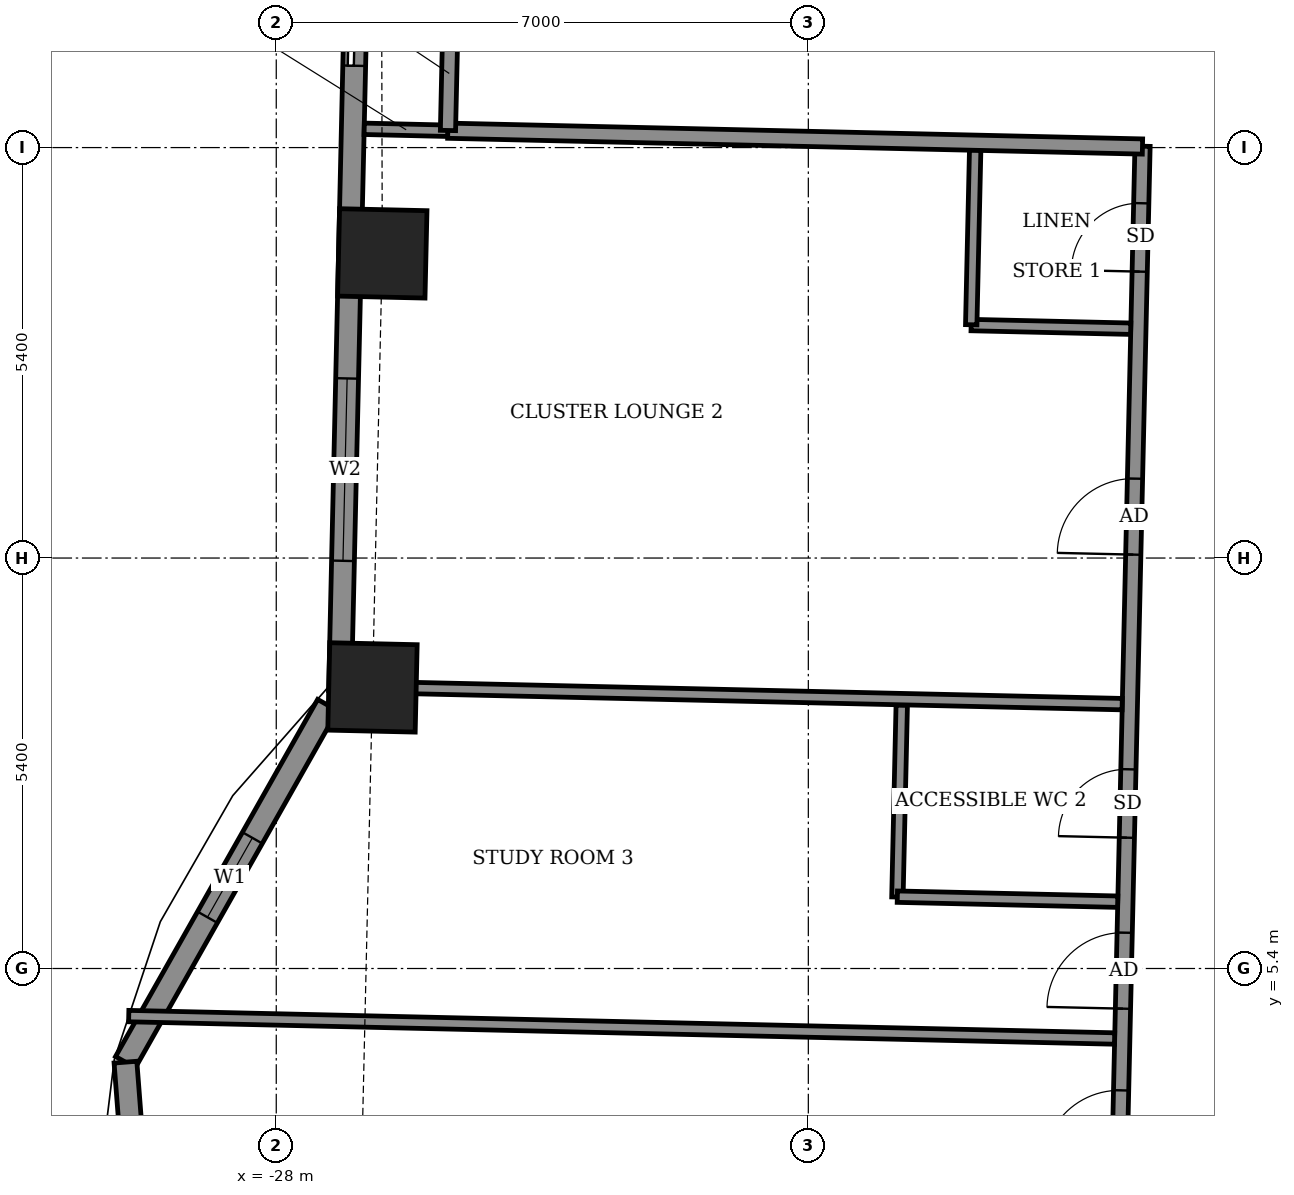
"""IFC4 building model, lengths in metres.
Left out: names, types, materials, properties, quantities, classifications, styles, units other than length and angle.
Written with IfcOpenShell. Run it as: python <this file> out.ifc"""

import sys

from ifc_helpers import new_model, si_unit, direction, frame, frame_2d, origin, origin_2d, place, context, subcontext, project, spatial, rectangle, extrude, element, fill, save


model = new_model("IFC4")
c1 = context("Model", 3, precision=1e-05, world=origin(), true_north=direction((0.0, 1.0)))
c2 = subcontext(c1, "Body", "Model", "MODEL_VIEW")
j1 = project(units=[si_unit("LENGTHUNIT", "METRE"), si_unit("PLANEANGLEUNIT", "RADIAN")], contexts=[c1])
p1 = place(None, origin())
s1 = spatial("IfcSite", under=j1, at=p1, CompositionType="ELEMENT")
p2 = place(p1, origin())
s2 = spatial("IfcBuilding", under=s1, at=p2, CompositionType="ELEMENT")
p3 = place(p2, frame((0.0, 0.0, 197.9)))
s3 = spatial("IfcBuildingStorey", under=s2, at=p3, CompositionType="ELEMENT", Elevation=197.9)
for number, where, z_axis, x_axis in (
    (1, (-26.605, 14.808, -0.55), (0.0, 0.0, 1.0), (-0.023, -1.0, 0.0)),
    (2, (-26.734, 9.098, -0.55), (0.0, 0.0, 1.0), (-0.023, -1.0, 0.0)),
):
    element("IfcColumn", number, at=place(p3, frame(where, z_axis=z_axis, x_axis=x_axis)), inside=s3, PredefinedType="COLUMN", context=c2, shape_type="SweptSolid", body=[
        extrude(rectangle(XDim=1.15, YDim=1.15, at=origin_2d()), origin(), (0.0, 0.0, 1.0), 3.6),
    ])
p4 = place(p3, frame((-26.904, 20.379, 0.0), z_axis=(0.0, 0.0, 1.0), x_axis=(-0.022669030322, -0.999743024514, 0.0)))
e3 = element("IfcWall", 3, at=p4, inside=s3, PredefinedType="SOLIDWALL", context=c2, shape_type="SweptSolid", body=[
    extrude(rectangle(XDim=11.33, YDim=0.3, at=frame_2d((5.665, 0.0))), origin(), (0.0, 0.0, 1.0), 2.55),
])
p5 = place(p4, frame((1.603, 0.0, 0.0)))
e4 = element("IfcOpeningElement", 4, at=p5, cuts=e3, PredefinedType="OPENING", context=c2, shape_type="SweptSolid", body=[
    extrude(rectangle(XDim=1.5, YDim=2.4, at=frame_2d((0.75, 1.2))), frame((0.0, 0.16, 0.0), z_axis=(0.0, -1.0, 0.0), x_axis=(1.0, 0.0, 0.0)), (0.0, 0.0, 1.0), 0.32),
])
p6 = place(p4, frame((7.218, 0.0, 0.9)))
e5 = element("IfcOpeningElement", 5, at=p6, cuts=e3, PredefinedType="OPENING", context=c2, shape_type="SweptSolid", body=[
    extrude(rectangle(XDim=2.4, YDim=1.5, at=frame_2d((1.2, 0.75))), frame((0.0, 0.16, 0.0), z_axis=(0.0, -1.0, 0.0), x_axis=(1.0, 0.0, 0.0)), (0.0, 0.0, 1.0), 0.32),
])
p7 = place(p3, frame((-27.325, 8.866, 0.0), z_axis=(0.0, 0.0, 1.0), x_axis=(-0.492554919955, -0.870281363025, 0.0)))
e6 = element("IfcWall", 6, at=p7, inside=s3, PredefinedType="SOLIDWALL", context=c2, shape_type="SweptSolid", body=[
    extrude(rectangle(XDim=5.398, YDim=0.3, at=frame_2d((2.699, 0.0))), origin(), (0.0, 0.0, 1.0), 3.05),
])
p8 = place(p7, frame((2.008, 0.0, 0.9)))
e7 = element("IfcOpeningElement", 7, at=p8, cuts=e6, PredefinedType="OPENING", context=c2, shape_type="SweptSolid", body=[
    extrude(rectangle(XDim=1.2, YDim=1.5, at=frame_2d((0.6, 0.75))), frame((0.0, 0.16, 0.0), z_axis=(0.0, -1.0, 0.0), x_axis=(1.0, 0.0, 0.0)), (0.0, 0.0, 1.0), 0.32),
])
p9 = place(p3, frame((-29.984, 4.168, 0.0), z_axis=(0.0, 0.0, 1.0), x_axis=(0.076964476481, -0.997033835614, 0.0)))
e8 = element("IfcWall", 8, at=p9, inside=s3, PredefinedType="SOLIDWALL", context=c2, shape_type="SweptSolid", body=[
    extrude(rectangle(XDim=5.573, YDim=0.3, at=frame_2d((2.787, 0.0))), origin(), (0.0, 0.0, 1.0), 3.05),
])
p10 = place(p9, frame((2.186, 0.0, 0.9)))
e9 = element("IfcOpeningElement", 9, at=p10, cuts=e8, PredefinedType="OPENING", context=c2, shape_type="SweptSolid", body=[
    extrude(rectangle(XDim=1.2, YDim=1.5, at=frame_2d((0.6, 0.75))), frame((0.0, 0.16, 0.0), z_axis=(0.0, -1.0, 0.0), x_axis=(1.0, 0.0, 0.0)), (0.0, 0.0, 1.0), 0.32),
])
p11 = place(p3, frame((-29.918, 9.42, 0.0), z_axis=(0.0, 0.0, 1.0), x_axis=(0.022681332769, 0.999742745482, 0.0)))
e10 = element("IfcWall", 10, at=p11, inside=s3, PredefinedType="USERDEFINED", context=c2, shape_type="SweptSolid", body=[
    extrude(rectangle(XDim=3.875, YDim=0.55, at=frame_2d((1.938, 0.0))), origin(), (0.0, 0.0, 1.0), 0.8),
])
p12 = place(p3, frame((-17.247, -12.149, 0.0), z_axis=(0.0, 0.0, 1.0), x_axis=(0.022698146637, 0.999742363881, 0.0)))
e11 = element("IfcWall", 11, at=p12, inside=s3, PredefinedType="PARTITIONING", context=c2, shape_type="SweptSolid", body=[
    extrude(rectangle(XDim=28.374, YDim=0.2, at=frame_2d((14.187, 0.0))), origin(), (0.0, 0.0, 1.0), 3.05),
])
p13 = place(p12, frame((23.0, 0.0, 0.0)))
e12 = element("IfcOpeningElement", 12, at=p13, cuts=e11, PredefinedType="OPENING", context=c2, shape_type="SweptSolid", body=[
    extrude(rectangle(XDim=1.0, YDim=2.1, at=frame_2d((0.5, 1.05))), frame((0.0, 0.11, 0.0), z_axis=(0.0, -1.0, 0.0), x_axis=(1.0, 0.0, 0.0)), (0.0, 0.0, 1.0), 0.22),
])
p14 = place(p12, frame((26.724, 0.0, 0.0)))
e13 = element("IfcOpeningElement", 13, at=p14, cuts=e11, PredefinedType="OPENING", context=c2, shape_type="SweptSolid", body=[
    extrude(rectangle(XDim=0.9, YDim=2.1, at=frame_2d((0.45, 1.05))), frame((0.0, 0.11, 0.0), z_axis=(0.0, -1.0, 0.0), x_axis=(1.0, 0.0, 0.0)), (0.0, 0.0, 1.0), 0.22),
])
p15 = place(p12, frame((17.025, 0.0, 0.0)))
e14 = element("IfcOpeningElement", 14, at=p15, cuts=e11, PredefinedType="OPENING", context=c2, shape_type="SweptSolid", body=[
    extrude(rectangle(XDim=1.0, YDim=2.1, at=frame_2d((0.5, 1.05))), frame((0.0, 0.11, 0.0), z_axis=(0.0, -1.0, 0.0), x_axis=(1.0, 0.0, 0.0)), (0.0, 0.0, 1.0), 0.22),
])
p16 = place(p12, frame((19.275, 0.0, 0.0)))
e15 = element("IfcOpeningElement", 15, at=p16, cuts=e11, PredefinedType="OPENING", context=c2, shape_type="SweptSolid", body=[
    extrude(rectangle(XDim=0.9, YDim=2.1, at=frame_2d((0.45, 1.05))), frame((0.0, 0.11, 0.0), z_axis=(0.0, -1.0, 0.0), x_axis=(1.0, 0.0, 0.0)), (0.0, 0.0, 1.0), 0.22),
])
p17 = place(p12, frame((14.95, 0.0, 0.0)))
e16 = element("IfcOpeningElement", 16, at=p17, cuts=e11, PredefinedType="OPENING", context=c2, shape_type="SweptSolid", body=[
    extrude(rectangle(XDim=1.0, YDim=2.1, at=frame_2d((0.5, 1.05))), frame((0.0, 0.11, 0.0), z_axis=(0.0, -1.0, 0.0), x_axis=(1.0, 0.0, 0.0)), (0.0, 0.0, 1.0), 0.22),
])
p18 = place(p12, frame((12.625, 0.0, 0.0)))
e17 = element("IfcOpeningElement", 17, at=p18, cuts=e11, PredefinedType="OPENING", context=c2, shape_type="SweptSolid", body=[
    extrude(rectangle(XDim=0.9, YDim=2.1, at=frame_2d((0.45, 1.05))), frame((0.0, 0.11, 0.0), z_axis=(0.0, -1.0, 0.0), x_axis=(1.0, 0.0, 0.0)), (0.0, 0.0, 1.0), 0.22),
])
p19 = place(p12, frame((10.275, 0.0, 0.0)))
e18 = element("IfcOpeningElement", 18, at=p19, cuts=e11, PredefinedType="OPENING", context=c2, shape_type="SweptSolid", body=[
    extrude(rectangle(XDim=1.0, YDim=2.1, at=frame_2d((0.5, 1.05))), frame((0.0, 0.11, 0.0), z_axis=(0.0, -1.0, 0.0), x_axis=(1.0, 0.0, 0.0)), (0.0, 0.0, 1.0), 0.22),
])
p20 = place(p12, frame((8.025, 0.0, 0.0)))
e19 = element("IfcOpeningElement", 19, at=p20, cuts=e11, PredefinedType="OPENING", context=c2, shape_type="SweptSolid", body=[
    extrude(rectangle(XDim=0.9, YDim=2.1, at=frame_2d((0.45, 1.05))), frame((0.0, 0.11, 0.0), z_axis=(0.0, -1.0, 0.0), x_axis=(1.0, 0.0, 0.0)), (0.0, 0.0, 1.0), 0.22),
])
p21 = place(p12, frame((4.337, 0.0, 0.0)))
e20 = element("IfcOpeningElement", 20, at=p21, cuts=e11, PredefinedType="OPENING", context=c2, shape_type="SweptSolid", body=[
    extrude(rectangle(XDim=1.0, YDim=2.1, at=frame_2d((0.5, 1.05))), frame((0.0, 0.11, 0.0), z_axis=(0.0, -1.0, 0.0), x_axis=(1.0, 0.0, 0.0)), (0.0, 0.0, 1.0), 0.22),
])
p22 = place(p12, frame((0.75, 0.0, 0.0)))
e21 = element("IfcOpeningElement", 21, at=p22, cuts=e11, PredefinedType="OPENING", context=c2, shape_type="SweptSolid", body=[
    extrude(rectangle(XDim=0.9, YDim=2.1, at=frame_2d((0.45, 1.05))), frame((0.0, 0.11, 0.0), z_axis=(0.0, -1.0, 0.0), x_axis=(1.0, 0.0, 0.0)), (0.0, 0.0, 1.0), 0.22),
])
p23 = place(p3, frame((-29.941, 4.774, 0.0), z_axis=(0.0, 0.0, 1.0), x_axis=(0.999741573163, -0.022732947207, 0.0)))
e22 = element("IfcWall", 22, at=p23, inside=s3, PredefinedType="PARTITIONING", context=c2, shape_type="SweptSolid", body=[
    extrude(rectangle(XDim=12.973, YDim=0.15, at=frame_2d((6.487, 0.0))), origin(), (0.0, 0.0, 1.0), 2.1),
])
p24 = place(p3, frame((-19.828, 6.34, 0.0), z_axis=(0.0, 0.0, 1.0), x_axis=(0.022532486354, 0.9997461113, 0.0)))
e23 = element("IfcWall", 23, at=p24, inside=s3, PredefinedType="PARTITIONING", context=c2, shape_type="SweptSolid", body=[
    extrude(rectangle(XDim=2.525, YDim=0.15, at=frame_2d((1.262, 0.0))), origin(), (0.0, 0.0, 1.0), 3.05),
])
p25 = place(p3, frame((-19.829, 6.345, 0.0), z_axis=(0.0, 0.0, 1.0), x_axis=(0.999741618182, -0.022730967319, 0.0)))
e24 = element("IfcWall", 24, at=p25, inside=s3, PredefinedType="PARTITIONING", context=c2, shape_type="SweptSolid", body=[
    extrude(rectangle(XDim=2.9, YDim=0.15, at=frame_2d((1.45, 0.0))), origin(), (0.0, 0.0, 1.0), 3.05),
])
p26 = place(p3, frame((-27.01, 9.108, 0.0), z_axis=(0.0, 0.0, 1.0), x_axis=(0.999742841246, -0.022677111331, 0.0)))
e25 = element("IfcWall", 25, at=p26, inside=s3, PredefinedType="PARTITIONING", context=c2, shape_type="SweptSolid", body=[
    extrude(rectangle(XDim=10.142, YDim=0.15, at=frame_2d((5.071, 0.0))), origin(), (0.0, 0.0, 1.0), 3.05),
])
p27 = place(p3, frame((-18.858, 13.865, 0.0), z_axis=(0.0, 0.0, 1.0), x_axis=(0.999737555419, -0.022908956429, 0.0)))
e26 = element("IfcWall", 26, at=p27, inside=s3, PredefinedType="PARTITIONING", context=c2, shape_type="SweptSolid", body=[
    extrude(rectangle(XDim=2.099, YDim=0.15, at=frame_2d((1.05, 0.0))), origin(), (0.0, 0.0, 1.0), 3.05),
])
p28 = place(p3, frame((-18.857, 13.869, 0.0), z_axis=(0.0, 0.0, 1.0), x_axis=(0.022612884682, 0.999744296031, 0.0)))
e27 = element("IfcWall", 27, at=p28, inside=s3, PredefinedType="PARTITIONING", context=c2, shape_type="SweptSolid", body=[
    extrude(rectangle(XDim=2.3, YDim=0.15, at=frame_2d((1.15, 0.0))), origin(), (0.0, 0.0, 1.0), 3.05),
])
p29 = place(p3, frame((-26.843, 16.447, 0.0), z_axis=(0.0, 0.0, 1.0), x_axis=(0.999720170098, -0.023655475055, 0.0)))
e28 = element("IfcWall", 28, at=p29, inside=s3, PredefinedType="PARTITIONING", context=c2, shape_type="SweptSolid", body=[
    extrude(rectangle(XDim=1.104, YDim=0.15, at=frame_2d((0.552, 0.0))), origin(), (0.0, 0.0, 1.0), 2.55),
])
p30 = place(p3, frame((-25.743, 16.422, 0.0), z_axis=(0.0, 0.0, 1.0), x_axis=(0.999741076645, -0.022754772455, 0.0)))
e29 = element("IfcWall", 29, at=p30, inside=s3, PredefinedType="PARTITIONING", context=c2, shape_type="SweptSolid", body=[
    extrude(rectangle(XDim=9.141, YDim=0.2, at=frame_2d((4.571, 0.0))), origin(), (0.0, 0.0, 1.0), 3.05),
])
p31 = place(p3, frame((-25.741, 16.425, 0.0), z_axis=(0.0, 0.0, 1.0), x_axis=(0.022617910375, 0.999744182344, 0.0)))
e30 = element("IfcWall", 30, at=p31, inside=s3, PredefinedType="PARTITIONING", context=c2, shape_type="SweptSolid", body=[
    extrude(rectangle(XDim=1.5, YDim=0.2, at=frame_2d((0.75, 0.0))), origin(), (0.0, 0.0, 1.0), 3.05),
])
p32 = place(p5, origin())
e31 = element("IfcDoor", 31, at=p32, inside=s3, OperationType="SLIDING_TO_LEFT", PredefinedType="DOOR", context=c2, shape_type="SweptSolid", body=[
    extrude(rectangle(XDim=1.5, YDim=2.4, at=frame_2d((0.75, 1.2))), frame((0.0, 0.025, 0.0), z_axis=(0.0, -1.0, 0.0), x_axis=(1.0, 0.0, 0.0)), (0.0, 0.0, 1.0), 0.05),
])
fill(e4, e31)
p33 = place(p6, origin())
e32 = element("IfcWindow", 32, at=p33, inside=s3, PartitioningType="DOUBLE_PANEL_VERTICAL", PredefinedType="WINDOW", context=c2, shape_type="SweptSolid", body=[
    extrude(rectangle(XDim=2.4, YDim=1.5, at=frame_2d((1.2, 0.75))), frame((0.0, 0.03, 0.0), z_axis=(0.0, -1.0, 0.0), x_axis=(1.0, 0.0, 0.0)), (0.0, 0.0, 1.0), 0.06),
])
fill(e5, e32)
p34 = place(p8, origin())
e33 = element("IfcWindow", 33, at=p34, inside=s3, PartitioningType="SINGLE_PANEL", PredefinedType="WINDOW", context=c2, shape_type="SweptSolid", body=[
    extrude(rectangle(XDim=1.2, YDim=1.5, at=frame_2d((0.6, 0.75))), frame((0.0, 0.03, 0.0), z_axis=(0.0, -1.0, 0.0), x_axis=(1.0, 0.0, 0.0)), (0.0, 0.0, 1.0), 0.06),
])
fill(e7, e33)
p35 = place(p13, origin())
e34 = element("IfcDoor", 34, at=p35, inside=s3, OperationType="SINGLE_SWING_LEFT", PredefinedType="DOOR", context=c2, shape_type="SweptSolid", body=[
    extrude(rectangle(XDim=1.0, YDim=2.1, at=frame_2d((0.5, 1.05))), frame((0.0, 0.025, 0.0), z_axis=(0.0, -1.0, 0.0), x_axis=(1.0, 0.0, 0.0)), (0.0, 0.0, 1.0), 0.05),
])
fill(e12, e34)
p36 = place(p14, origin())
e35 = element("IfcDoor", 35, at=p36, inside=s3, OperationType="SINGLE_SWING_RIGHT", PredefinedType="DOOR", context=c2, shape_type="SweptSolid", body=[
    extrude(rectangle(XDim=0.9, YDim=2.1, at=frame_2d((0.45, 1.05))), frame((0.0, 0.025, 0.0), z_axis=(0.0, -1.0, 0.0), x_axis=(1.0, 0.0, 0.0)), (0.0, 0.0, 1.0), 0.05),
])
fill(e13, e35)
p37 = place(p15, origin())
e36 = element("IfcDoor", 36, at=p37, inside=s3, OperationType="SINGLE_SWING_RIGHT", PredefinedType="DOOR", context=c2, shape_type="SweptSolid", body=[
    extrude(rectangle(XDim=1.0, YDim=2.1, at=frame_2d((0.5, 1.05))), frame((0.0, 0.025, 0.0), z_axis=(0.0, -1.0, 0.0), x_axis=(1.0, 0.0, 0.0)), (0.0, 0.0, 1.0), 0.05),
])
fill(e14, e36)
p38 = place(p16, origin())
e37 = element("IfcDoor", 37, at=p38, inside=s3, OperationType="SINGLE_SWING_LEFT", PredefinedType="DOOR", context=c2, shape_type="SweptSolid", body=[
    extrude(rectangle(XDim=0.9, YDim=2.1, at=frame_2d((0.45, 1.05))), frame((0.0, 0.025, 0.0), z_axis=(0.0, -1.0, 0.0), x_axis=(1.0, 0.0, 0.0)), (0.0, 0.0, 1.0), 0.05),
])
fill(e15, e37)
p39 = place(p17, origin())
e38 = element("IfcDoor", 38, at=p39, inside=s3, OperationType="SINGLE_SWING_LEFT", PredefinedType="DOOR", context=c2, shape_type="SweptSolid", body=[
    extrude(rectangle(XDim=1.0, YDim=2.1, at=frame_2d((0.5, 1.05))), frame((0.0, 0.025, 0.0), z_axis=(0.0, -1.0, 0.0), x_axis=(1.0, 0.0, 0.0)), (0.0, 0.0, 1.0), 0.05),
])
fill(e16, e38)
save(model, sys.argv[1])
